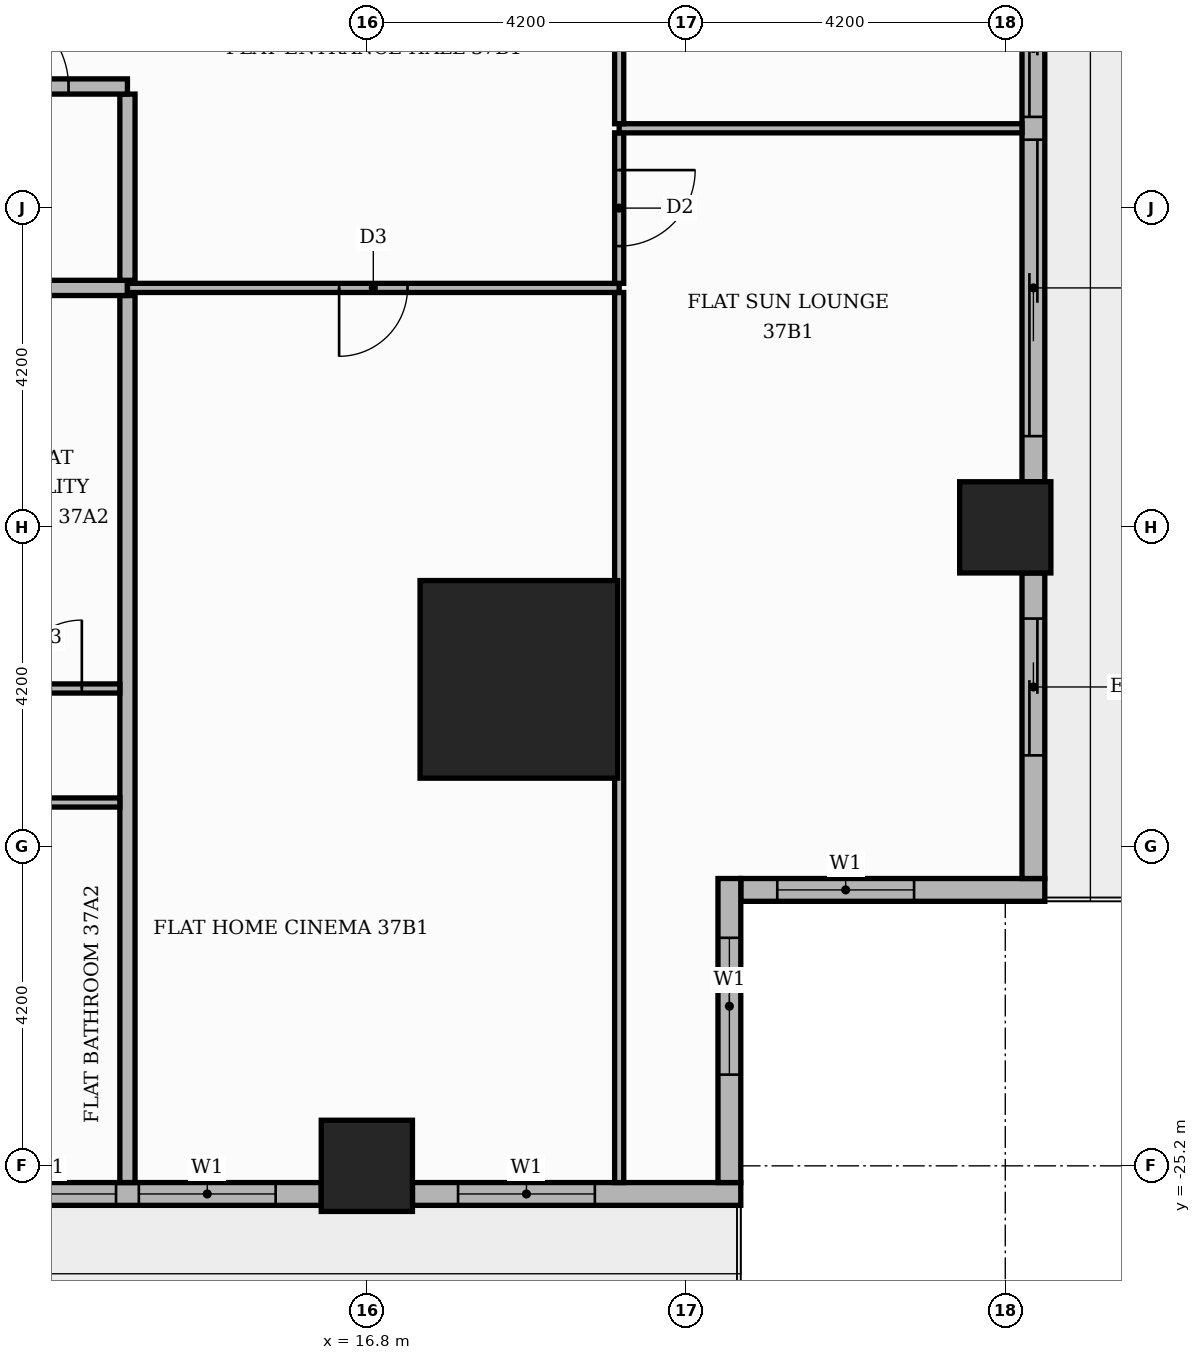
"""IFC4 building model, lengths in metres.
Left out: names, types, materials, properties, quantities, classifications, styles, units other than length and angle.
Written with IfcOpenShell. Run it as: python <this file> out.ifc"""

import sys

from ifc_helpers import new_model, si_unit, direction, frame, frame_2d, origin, origin_2d, place, context, subcontext, project, spatial, rectangle, extrude, element, fill, save


model = new_model("IFC4")
c1 = context("Model", 3, precision=1e-05, world=origin(), true_north=direction((0.0, 1.0)))
c2 = subcontext(c1, "Body", "Model", "MODEL_VIEW")
j1 = project(units=[si_unit("LENGTHUNIT", "METRE"), si_unit("PLANEANGLEUNIT", "RADIAN")], contexts=[c1])
p1 = place(None, origin())
s1 = spatial("IfcSite", under=j1, at=p1, CompositionType="ELEMENT")
p2 = place(p1, origin())
s2 = spatial("IfcBuilding", under=s1, at=p2, CompositionType="ELEMENT")
p3 = place(p2, frame((0.0, 0.0, 157.2)))
s3 = spatial("IfcBuildingStorey", under=s2, at=p3, CompositionType="ELEMENT", Elevation=157.2)
p4 = place(p3, frame((18.8, -18.8, 0.0), z_axis=(0.0, 0.0, 1.0), x_axis=(1.0, 0.0, 0.0)))
e1 = element("IfcColumn", 1, at=p4, inside=s3, PredefinedType="COLUMN", context=c2, shape_type="SweptSolid", body=[
    extrude(rectangle(XDim=2.6, YDim=2.6, at=origin_2d()), origin(), (0.0, 0.0, 1.0), 3.9),
])
for number, where, z_axis, x_axis in (
    (2, (25.2, -16.8, 0.0), (0.0, 0.0, 1.0), (1.0, 0.0, 0.0)),
    (3, (16.8, -25.2, 0.0), (0.0, 0.0, 1.0), (1.0, 0.0, 0.0)),
):
    element("IfcColumn", number, at=place(p3, frame(where, z_axis=z_axis, x_axis=x_axis)), inside=s3, PredefinedType="COLUMN", context=c2, shape_type="SweptSolid", body=[
        extrude(rectangle(XDim=1.2, YDim=1.2, at=origin_2d()), origin(), (0.0, 0.0, 1.0), 3.9),
    ])
p5 = place(p3, frame((21.72, -21.57, 0.0), z_axis=(0.0, 0.0, 1.0), x_axis=(1.0, 0.0, 0.0)))
e4 = element("IfcWall", 4, at=p5, inside=s3, PredefinedType="STANDARD", context=c2, shape_type="SweptSolid", body=[
    extrude(rectangle(XDim=4.0, YDim=0.3, at=frame_2d((2.0, 0.0))), origin(), (0.0, 0.0, 1.0), 3.48),
])
p6 = place(p5, frame((0.48, 0.0, 0.9)))
e5 = element("IfcOpeningElement", 5, at=p6, cuts=e4, PredefinedType="OPENING", context=c2, shape_type="SweptSolid", body=[
    extrude(rectangle(XDim=1.8, YDim=2.1, at=frame_2d((0.9, 1.05))), frame((0.0, 0.16, 0.0), z_axis=(0.0, -1.0, 0.0), x_axis=(1.0, 0.0, 0.0)), (0.0, 0.0, 1.0), 0.32),
])
p7 = place(p3, frame((25.57, -21.42, 0.0), z_axis=(0.0, 0.0, 1.0), x_axis=(0.0, 1.0, 0.0)))
e6 = element("IfcWall", 6, at=p7, inside=s3, PredefinedType="STANDARD", context=c2, shape_type="SweptSolid", body=[
    extrude(rectangle(XDim=4.02, YDim=0.3, at=frame_2d((2.01, 0.0))), origin(), (0.0, 0.0, 1.0), 3.48),
])
p8 = place(p7, frame((1.62, 0.0, 0.0)))
e7 = element("IfcOpeningElement", 7, at=p8, cuts=e6, PredefinedType="OPENING", context=c2, shape_type="SweptSolid", body=[
    extrude(rectangle(XDim=1.8, YDim=2.4, at=frame_2d((0.9, 1.2))), frame((0.0, 0.16, 0.0), z_axis=(0.0, -1.0, 0.0), x_axis=(1.0, 0.0, 0.0)), (0.0, 0.0, 1.0), 0.32),
])
p9 = place(p3, frame((25.57, -16.2, 0.0), z_axis=(0.0, 0.0, 1.0), x_axis=(0.0, 1.0, 0.0)))
e8 = element("IfcWall", 8, at=p9, inside=s3, PredefinedType="STANDARD", context=c2, shape_type="SweptSolid", body=[
    extrude(rectangle(XDim=7.2, YDim=0.3, at=frame_2d((3.6, 0.0))), origin(), (0.0, 0.0, 1.0), 3.48),
])
p10 = place(p9, frame((0.6, 0.0, 0.0)))
e9 = element("IfcOpeningElement", 9, at=p10, cuts=e8, PredefinedType="OPENING", context=c2, shape_type="SweptSolid", body=[
    extrude(rectangle(XDim=3.9, YDim=2.4, at=frame_2d((1.95, 1.2))), frame((0.0, 0.16, 0.0), z_axis=(0.0, -1.0, 0.0), x_axis=(1.0, 0.0, 0.0)), (0.0, 0.0, 1.0), 0.32),
])
p11 = place(p9, frame((4.8, 0.0, 0.0)))
e10 = element("IfcOpeningElement", 10, at=p11, cuts=e8, PredefinedType="OPENING", context=c2, shape_type="SweptSolid", body=[
    extrude(rectangle(XDim=1.8, YDim=2.4, at=frame_2d((0.9, 1.2))), frame((0.0, 0.16, 0.0), z_axis=(0.0, -1.0, 0.0), x_axis=(1.0, 0.0, 0.0)), (0.0, 0.0, 1.0), 0.32),
])
p12 = place(p3, frame((9.0, -25.57, 0.0), z_axis=(0.0, 0.0, 1.0), x_axis=(1.0, 0.0, 0.0)))
e11 = element("IfcWall", 11, at=p12, inside=s3, PredefinedType="STANDARD", context=c2, shape_type="SweptSolid", body=[
    extrude(rectangle(XDim=7.2, YDim=0.3, at=frame_2d((3.6, 0.0))), origin(), (0.0, 0.0, 1.0), 3.48),
])
p13 = place(p12, frame((0.6, 0.0, 0.9)))
e12 = element("IfcOpeningElement", 12, at=p13, cuts=e11, PredefinedType="OPENING", context=c2, shape_type="SweptSolid", body=[
    extrude(rectangle(XDim=1.8, YDim=2.1, at=frame_2d((0.9, 1.05))), frame((0.0, 0.16, 0.0), z_axis=(0.0, -1.0, 0.0), x_axis=(1.0, 0.0, 0.0)), (0.0, 0.0, 1.0), 0.32),
])
p14 = place(p12, frame((2.7, 0.0, 0.9)))
e13 = element("IfcOpeningElement", 13, at=p14, cuts=e11, PredefinedType="OPENING", context=c2, shape_type="SweptSolid", body=[
    extrude(rectangle(XDim=1.8, YDim=2.1, at=frame_2d((0.9, 1.05))), frame((0.0, 0.16, 0.0), z_axis=(0.0, -1.0, 0.0), x_axis=(1.0, 0.0, 0.0)), (0.0, 0.0, 1.0), 0.32),
])
p15 = place(p12, frame((4.8, 0.0, 0.9)))
e14 = element("IfcOpeningElement", 14, at=p15, cuts=e11, PredefinedType="OPENING", context=c2, shape_type="SweptSolid", body=[
    extrude(rectangle(XDim=1.8, YDim=2.1, at=frame_2d((0.9, 1.05))), frame((0.0, 0.16, 0.0), z_axis=(0.0, -1.0, 0.0), x_axis=(1.0, 0.0, 0.0)), (0.0, 0.0, 1.0), 0.32),
])
p16 = place(p3, frame((17.4, -25.57, 0.0), z_axis=(0.0, 0.0, 1.0), x_axis=(1.0, 0.0, 0.0)))
e15 = element("IfcWall", 15, at=p16, inside=s3, PredefinedType="STANDARD", context=c2, shape_type="SweptSolid", body=[
    extrude(rectangle(XDim=4.32, YDim=0.3, at=frame_2d((2.16, 0.0))), origin(), (0.0, 0.0, 1.0), 3.48),
])
p17 = place(p16, frame((0.6, 0.0, 0.9)))
e16 = element("IfcOpeningElement", 16, at=p17, cuts=e15, PredefinedType="OPENING", context=c2, shape_type="SweptSolid", body=[
    extrude(rectangle(XDim=1.8, YDim=2.1, at=frame_2d((0.9, 1.05))), frame((0.0, 0.16, 0.0), z_axis=(0.0, -1.0, 0.0), x_axis=(1.0, 0.0, 0.0)), (0.0, 0.0, 1.0), 0.32),
])
p18 = place(p3, frame((21.57, -25.42, 0.0), z_axis=(0.0, 0.0, 1.0), x_axis=(0.0, 1.0, 0.0)))
e17 = element("IfcWall", 17, at=p18, inside=s3, PredefinedType="STANDARD", context=c2, shape_type="SweptSolid", body=[
    extrude(rectangle(XDim=4.0, YDim=0.3, at=frame_2d((2.0, 0.0))), origin(), (0.0, 0.0, 1.0), 3.48),
])
p19 = place(p18, frame((1.42, 0.0, 0.9)))
e18 = element("IfcOpeningElement", 18, at=p19, cuts=e17, PredefinedType="OPENING", context=c2, shape_type="SweptSolid", body=[
    extrude(rectangle(XDim=1.8, YDim=2.1, at=frame_2d((0.9, 1.05))), frame((0.0, 0.16, 0.0), z_axis=(0.0, -1.0, 0.0), x_axis=(1.0, 0.0, 0.0)), (0.0, 0.0, 1.0), 0.32),
])
p20 = place(p3, frame((13.65, -25.42, 0.0), z_axis=(0.0, 0.0, 1.0), x_axis=(0.0, 1.0, 0.0)))
e19 = element("IfcWall", 19, at=p20, inside=s3, PredefinedType="PARTITIONING", context=c2, shape_type="SweptSolid", body=[
    extrude(rectangle(XDim=11.67, YDim=0.2, at=frame_2d((5.835, 0.0))), origin(), (0.0, 0.0, 1.0), 3.48),
])
p21 = place(p3, frame((20.12, -25.42, 0.0), z_axis=(0.0, 0.0, 1.0), x_axis=(0.0, 1.0, 0.0)))
e20 = element("IfcWall", 20, at=p21, inside=s3, PredefinedType="PARTITIONING", context=c2, shape_type="SweptSolid", body=[
    extrude(rectangle(XDim=11.71, YDim=0.12, at=frame_2d((5.855, 0.0))), origin(), (0.0, 0.0, 1.0), 3.48),
])
p22 = place(p3, frame((-5.15, -20.42, 0.0), z_axis=(0.0, 0.0, 1.0), x_axis=(1.0, 0.0, 0.0)))
e21 = element("IfcWall", 21, at=p22, inside=s3, PredefinedType="PARTITIONING", context=c2, shape_type="SweptSolid", body=[
    extrude(rectangle(XDim=18.7, YDim=0.12, at=frame_2d((9.35, 0.0))), origin(), (0.0, 0.0, 1.0), 3.48),
])
p23 = place(p22, frame((1.5, 0.0, 0.0)))
e22 = element("IfcOpeningElement", 22, at=p23, cuts=e21, PredefinedType="OPENING", context=c2, shape_type="SweptSolid", body=[
    extrude(rectangle(XDim=1.0, YDim=2.1, at=frame_2d((0.5, 1.05))), frame((0.0, 0.07, 0.0), z_axis=(0.0, -1.0, 0.0), x_axis=(1.0, 0.0, 0.0)), (0.0, 0.0, 1.0), 0.14),
])
p24 = place(p22, frame((5.75, 0.0, 0.0)))
e23 = element("IfcOpeningElement", 23, at=p24, cuts=e21, PredefinedType="OPENING", context=c2, shape_type="SweptSolid", body=[
    extrude(rectangle(XDim=0.9, YDim=2.1, at=frame_2d((0.45, 1.05))), frame((0.0, 0.07, 0.0), z_axis=(0.0, -1.0, 0.0), x_axis=(1.0, 0.0, 0.0)), (0.0, 0.0, 1.0), 0.14),
])
p25 = place(p22, frame((14.15, 0.0, 0.0)))
e24 = element("IfcOpeningElement", 24, at=p25, cuts=e21, PredefinedType="OPENING", context=c2, shape_type="SweptSolid", body=[
    extrude(rectangle(XDim=0.9, YDim=2.1, at=frame_2d((0.45, 1.05))), frame((0.0, 0.07, 0.0), z_axis=(0.0, -1.0, 0.0), x_axis=(1.0, 0.0, 0.0)), (0.0, 0.0, 1.0), 0.14),
])
p26 = place(p3, frame((-1.05, -18.92, 0.0), z_axis=(0.0, 0.0, 1.0), x_axis=(1.0, 0.0, 0.0)))
e25 = element("IfcWall", 25, at=p26, inside=s3, PredefinedType="PARTITIONING", context=c2, shape_type="SweptSolid", body=[
    extrude(rectangle(XDim=14.6, YDim=0.12, at=frame_2d((7.3, 0.0))), origin(), (0.0, 0.0, 1.0), 3.48),
])
p27 = place(p26, frame((2.7, 0.0, 0.0)))
e26 = element("IfcOpeningElement", 26, at=p27, cuts=e25, PredefinedType="OPENING", context=c2, shape_type="SweptSolid", body=[
    extrude(rectangle(XDim=0.9, YDim=2.1, at=frame_2d((0.45, 1.05))), frame((0.0, 0.07, 0.0), z_axis=(0.0, -1.0, 0.0), x_axis=(1.0, 0.0, 0.0)), (0.0, 0.0, 1.0), 0.14),
])
p28 = place(p26, frame((7.05, 0.0, 0.0)))
e27 = element("IfcOpeningElement", 27, at=p28, cuts=e25, PredefinedType="OPENING", context=c2, shape_type="SweptSolid", body=[
    extrude(rectangle(XDim=0.9, YDim=2.1, at=frame_2d((0.45, 1.05))), frame((0.0, 0.07, 0.0), z_axis=(0.0, -1.0, 0.0), x_axis=(1.0, 0.0, 0.0)), (0.0, 0.0, 1.0), 0.14),
])
p29 = place(p26, frame((10.2, 0.0, 0.0)))
e28 = element("IfcOpeningElement", 28, at=p29, cuts=e25, PredefinedType="OPENING", context=c2, shape_type="SweptSolid", body=[
    extrude(rectangle(XDim=0.9, YDim=2.1, at=frame_2d((0.45, 1.05))), frame((0.0, 0.07, 0.0), z_axis=(0.0, -1.0, 0.0), x_axis=(1.0, 0.0, 0.0)), (0.0, 0.0, 1.0), 0.14),
])
p30 = place(p26, frame((13.2, 0.0, 0.0)))
e29 = element("IfcOpeningElement", 29, at=p30, cuts=e25, PredefinedType="OPENING", context=c2, shape_type="SweptSolid", body=[
    extrude(rectangle(XDim=0.9, YDim=2.1, at=frame_2d((0.45, 1.05))), frame((0.0, 0.07, 0.0), z_axis=(0.0, -1.0, 0.0), x_axis=(1.0, 0.0, 0.0)), (0.0, 0.0, 1.0), 0.14),
])
p31 = place(p3, frame((-25.42, -13.65, 0.0), z_axis=(0.0, 0.0, 1.0), x_axis=(1.0, 0.0, 0.0)))
e30 = element("IfcWall", 30, at=p31, inside=s3, PredefinedType="PARTITIONING", context=c2, shape_type="SweptSolid", body=[
    extrude(rectangle(XDim=39.07, YDim=0.2, at=frame_2d((19.535, 0.0))), origin(), (0.0, 0.0, 1.0), 3.48),
])
p32 = place(p31, frame((13.32, 0.0, 0.0)))
e31 = element("IfcOpeningElement", 31, at=p32, cuts=e30, PredefinedType="OPENING", context=c2, shape_type="SweptSolid", body=[
    extrude(rectangle(XDim=1.1, YDim=2.4, at=frame_2d((0.55, 1.2))), frame((0.0, 0.11, 0.0), z_axis=(0.0, -1.0, 0.0), x_axis=(1.0, 0.0, 0.0)), (0.0, 0.0, 1.0), 0.22),
])
p33 = place(p31, frame((21.72, 0.0, 0.0)))
e32 = element("IfcOpeningElement", 32, at=p33, cuts=e30, PredefinedType="OPENING", context=c2, shape_type="SweptSolid", body=[
    extrude(rectangle(XDim=1.1, YDim=2.4, at=frame_2d((0.55, 1.2))), frame((0.0, 0.11, 0.0), z_axis=(0.0, -1.0, 0.0), x_axis=(1.0, 0.0, 0.0)), (0.0, 0.0, 1.0), 0.22),
])
p34 = place(p3, frame((13.65, -13.65, 0.0), z_axis=(0.0, 0.0, 1.0), x_axis=(1.0, 0.0, 0.0)))
e33 = element("IfcWall", 33, at=p34, inside=s3, PredefinedType="PARTITIONING", context=c2, shape_type="SweptSolid", body=[
    extrude(rectangle(XDim=6.47, YDim=0.12, at=frame_2d((3.235, 0.0))), origin(), (0.0, 0.0, 1.0), 3.48),
])
p35 = place(p34, frame((2.785, 0.0, 0.0)))
e34 = element("IfcOpeningElement", 34, at=p35, cuts=e33, PredefinedType="OPENING", context=c2, shape_type="SweptSolid", body=[
    extrude(rectangle(XDim=0.9, YDim=2.1, at=frame_2d((0.45, 1.05))), frame((0.0, 0.07, 0.0), z_axis=(0.0, -1.0, 0.0), x_axis=(1.0, 0.0, 0.0)), (0.0, 0.0, 1.0), 0.14),
])
p36 = place(p3, frame((20.12, -13.59, 0.0), z_axis=(0.0, 0.0, 1.0), x_axis=(0.0, 1.0, 0.0)))
e35 = element("IfcWall", 35, at=p36, inside=s3, PredefinedType="PARTITIONING", context=c2, shape_type="SweptSolid", body=[
    extrude(rectangle(XDim=1.98, YDim=0.12, at=frame_2d((0.99, 0.0))), origin(), (0.0, 0.0, 1.0), 3.48),
])
p37 = place(p36, frame((0.49, 0.0, 0.0)))
e36 = element("IfcOpeningElement", 36, at=p37, cuts=e35, PredefinedType="OPENING", context=c2, shape_type="SweptSolid", body=[
    extrude(rectangle(XDim=1.0, YDim=2.1, at=frame_2d((0.5, 1.05))), frame((0.0, 0.07, 0.0), z_axis=(0.0, -1.0, 0.0), x_axis=(1.0, 0.0, 0.0)), (0.0, 0.0, 1.0), 0.14),
])
p38 = place(p3, frame((13.65, -13.55, 0.0), z_axis=(0.0, 0.0, 1.0), x_axis=(0.0, 1.0, 0.0)))
e37 = element("IfcWall", 37, at=p38, inside=s3, PredefinedType="PARTITIONING", context=c2, shape_type="SweptSolid", body=[
    extrude(rectangle(XDim=2.45, YDim=0.2, at=frame_2d((1.225, 0.0))), origin(), (0.0, 0.0, 1.0), 3.48),
])
p39 = place(p3, frame((20.12, -11.55, 0.0), z_axis=(0.0, 0.0, 1.0), x_axis=(1.0, 0.0, 0.0)))
e38 = element("IfcWall", 38, at=p39, inside=s3, PredefinedType="PARTITIONING", context=c2, shape_type="SweptSolid", body=[
    extrude(rectangle(XDim=5.3, YDim=0.12, at=frame_2d((2.65, 0.0))), origin(), (0.0, 0.0, 1.0), 3.48),
])
p40 = place(p3, frame((20.12, -11.49, 0.0), z_axis=(0.0, 0.0, 1.0), x_axis=(0.0, 1.0, 0.0)))
e39 = element("IfcWall", 39, at=p40, inside=s3, PredefinedType="PARTITIONING", context=c2, shape_type="SweptSolid", body=[
    extrude(rectangle(XDim=8.28, YDim=0.12, at=frame_2d((4.14, 0.0))), origin(), (0.0, 0.0, 1.0), 3.48),
])
p41 = place(p40, frame((3.64, 0.0, 0.0)))
e40 = element("IfcOpeningElement", 40, at=p41, cuts=e39, PredefinedType="OPENING", context=c2, shape_type="SweptSolid", body=[
    extrude(rectangle(XDim=1.0, YDim=2.1, at=frame_2d((0.5, 1.05))), frame((0.0, 0.07, 0.0), z_axis=(0.0, -1.0, 0.0), x_axis=(1.0, 0.0, 0.0)), (0.0, 0.0, 1.0), 0.14),
])
p42 = place(p3, frame((11.0, -11.0, 0.0), z_axis=(0.0, 0.0, 1.0), x_axis=(1.0, 0.0, 0.0)))
e41 = element("IfcWall", 41, at=p42, inside=s3, PredefinedType="PARTITIONING", context=c2, shape_type="SweptSolid", body=[
    extrude(rectangle(XDim=2.65, YDim=0.2, at=frame_2d((1.325, 0.0))), origin(), (0.0, 0.0, 1.0), 3.48),
])
p43 = place(p42, frame((0.775, 0.0, 0.0)))
e42 = element("IfcOpeningElement", 42, at=p43, cuts=e41, PredefinedType="OPENING", context=c2, shape_type="SweptSolid", body=[
    extrude(rectangle(XDim=1.1, YDim=2.4, at=frame_2d((0.55, 1.2))), frame((0.0, 0.11, 0.0), z_axis=(0.0, -1.0, 0.0), x_axis=(1.0, 0.0, 0.0)), (0.0, 0.0, 1.0), 0.22),
])
p44 = place(p6, origin())
e43 = element("IfcWindow", 43, at=p44, inside=s3, PartitioningType="SINGLE_PANEL", PredefinedType="WINDOW", context=c2, shape_type="SweptSolid", body=[
    extrude(rectangle(XDim=1.8, YDim=2.1, at=frame_2d((0.9, 1.05))), frame((0.0, 0.03, 0.0), z_axis=(0.0, -1.0, 0.0), x_axis=(1.0, 0.0, 0.0)), (0.0, 0.0, 1.0), 0.06),
])
fill(e5, e43)
p45 = place(p8, origin())
e44 = element("IfcDoor", 44, at=p45, inside=s3, OperationType="SLIDING_TO_RIGHT", PredefinedType="DOOR", context=c2, shape_type="SweptSolid", body=[
    extrude(rectangle(XDim=1.8, YDim=2.4, at=frame_2d((0.9, 1.2))), frame((0.0, 0.025, 0.0), z_axis=(0.0, -1.0, 0.0), x_axis=(1.0, 0.0, 0.0)), (0.0, 0.0, 1.0), 0.05),
])
fill(e7, e44)
p46 = place(p10, origin())
e45 = element("IfcDoor", 45, at=p46, inside=s3, OperationType="SLIDING_TO_LEFT", PredefinedType="DOOR", context=c2, shape_type="SweptSolid", body=[
    extrude(rectangle(XDim=3.9, YDim=2.4, at=frame_2d((1.95, 1.2))), frame((0.0, 0.025, 0.0), z_axis=(0.0, -1.0, 0.0), x_axis=(1.0, 0.0, 0.0)), (0.0, 0.0, 1.0), 0.05),
])
fill(e9, e45)
p47 = place(p11, origin())
e46 = element("IfcDoor", 46, at=p47, inside=s3, OperationType="SLIDING_TO_RIGHT", PredefinedType="DOOR", context=c2, shape_type="SweptSolid", body=[
    extrude(rectangle(XDim=1.8, YDim=2.4, at=frame_2d((0.9, 1.2))), frame((0.0, 0.025, 0.0), z_axis=(0.0, -1.0, 0.0), x_axis=(1.0, 0.0, 0.0)), (0.0, 0.0, 1.0), 0.05),
])
fill(e10, e46)
p48 = place(p14, origin())
e47 = element("IfcWindow", 47, at=p48, inside=s3, PartitioningType="SINGLE_PANEL", PredefinedType="WINDOW", context=c2, shape_type="SweptSolid", body=[
    extrude(rectangle(XDim=1.8, YDim=2.1, at=frame_2d((0.9, 1.05))), frame((0.0, 0.03, 0.0), z_axis=(0.0, -1.0, 0.0), x_axis=(1.0, 0.0, 0.0)), (0.0, 0.0, 1.0), 0.06),
])
fill(e13, e47)
p49 = place(p15, origin())
e48 = element("IfcWindow", 48, at=p49, inside=s3, PartitioningType="SINGLE_PANEL", PredefinedType="WINDOW", context=c2, shape_type="SweptSolid", body=[
    extrude(rectangle(XDim=1.8, YDim=2.1, at=frame_2d((0.9, 1.05))), frame((0.0, 0.03, 0.0), z_axis=(0.0, -1.0, 0.0), x_axis=(1.0, 0.0, 0.0)), (0.0, 0.0, 1.0), 0.06),
])
fill(e14, e48)
p50 = place(p17, origin())
e49 = element("IfcWindow", 49, at=p50, inside=s3, PartitioningType="SINGLE_PANEL", PredefinedType="WINDOW", context=c2, shape_type="SweptSolid", body=[
    extrude(rectangle(XDim=1.8, YDim=2.1, at=frame_2d((0.9, 1.05))), frame((0.0, 0.03, 0.0), z_axis=(0.0, -1.0, 0.0), x_axis=(1.0, 0.0, 0.0)), (0.0, 0.0, 1.0), 0.06),
])
fill(e16, e49)
p51 = place(p19, origin())
e50 = element("IfcWindow", 50, at=p51, inside=s3, PartitioningType="SINGLE_PANEL", PredefinedType="WINDOW", context=c2, shape_type="SweptSolid", body=[
    extrude(rectangle(XDim=1.8, YDim=2.1, at=frame_2d((0.9, 1.05))), frame((0.0, 0.03, 0.0), z_axis=(0.0, -1.0, 0.0), x_axis=(1.0, 0.0, 0.0)), (0.0, 0.0, 1.0), 0.06),
])
fill(e18, e50)
p52 = place(p30, origin())
e51 = element("IfcDoor", 51, at=p52, inside=s3, OperationType="SINGLE_SWING_RIGHT", PredefinedType="DOOR", context=c2, shape_type="SweptSolid", body=[
    extrude(rectangle(XDim=0.9, YDim=2.1, at=frame_2d((0.45, 1.05))), frame((0.0, 0.025, 0.0), z_axis=(0.0, -1.0, 0.0), x_axis=(1.0, 0.0, 0.0)), (0.0, 0.0, 1.0), 0.05),
])
fill(e29, e51)
p53 = place(p43, origin())
e52 = element("IfcDoor", 52, at=p53, inside=s3, OperationType="SINGLE_SWING_LEFT", PredefinedType="DOOR", context=c2, shape_type="SweptSolid", body=[
    extrude(rectangle(XDim=1.1, YDim=2.4, at=frame_2d((0.55, 1.2))), frame((0.0, 0.025, 0.0), z_axis=(0.0, -1.0, 0.0), x_axis=(1.0, 0.0, 0.0)), (0.0, 0.0, 1.0), 0.05),
])
fill(e42, e52)
p54 = place(p35, frame((0.9, 0.0, 0.0), z_axis=(0.0, 0.0, 1.0), x_axis=(-1.0, 0.0, 0.0)))
e53 = element("IfcDoor", 53, at=p54, inside=s3, OperationType="SINGLE_SWING_LEFT", PredefinedType="DOOR", context=c2, shape_type="SweptSolid", body=[
    extrude(rectangle(XDim=0.9, YDim=2.1, at=frame_2d((0.45, 1.05))), frame((0.0, 0.025, 0.0), z_axis=(0.0, -1.0, 0.0), x_axis=(1.0, 0.0, 0.0)), (0.0, 0.0, 1.0), 0.05),
])
fill(e34, e53)
p55 = place(p37, frame((1.0, 0.0, 0.0), z_axis=(0.0, 0.0, 1.0), x_axis=(-1.0, 0.0, 0.0)))
e54 = element("IfcDoor", 54, at=p55, inside=s3, OperationType="SINGLE_SWING_RIGHT", PredefinedType="DOOR", context=c2, shape_type="SweptSolid", body=[
    extrude(rectangle(XDim=1.0, YDim=2.1, at=frame_2d((0.5, 1.05))), frame((0.0, 0.025, 0.0), z_axis=(0.0, -1.0, 0.0), x_axis=(1.0, 0.0, 0.0)), (0.0, 0.0, 1.0), 0.05),
])
fill(e36, e54)
save(model, sys.argv[1])
